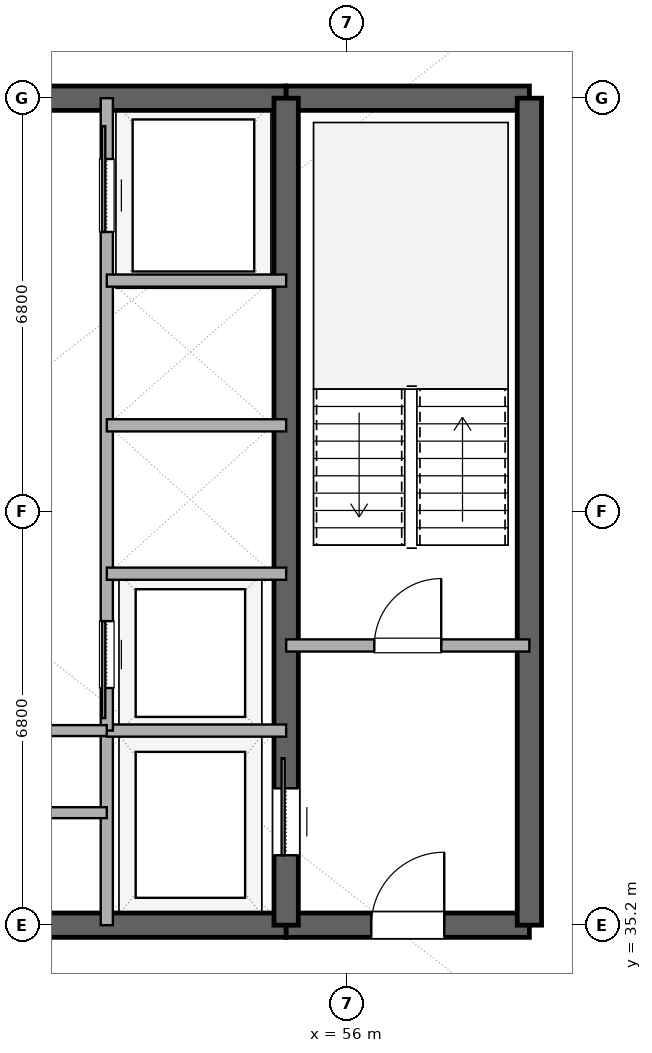
"""IFC4 building model, lengths in metres.
Left out: names, types, materials, properties, quantities, classifications, styles, units other than length and angle.
Written with IfcOpenShell. Run it as: python <this file> out.ifc"""

import sys

from ifc_helpers import new_model, si_unit, direction, frame, frame_2d, origin, place, context, subcontext, project, spatial, rectangle, extrude, element, fill, save


model = new_model("IFC4")
c1 = context("Model", 3, precision=1e-05, world=origin(), true_north=direction((0.0, 1.0)))
c2 = subcontext(c1, "Body", "Model", "MODEL_VIEW")
j1 = project(units=[si_unit("LENGTHUNIT", "METRE"), si_unit("PLANEANGLEUNIT", "RADIAN")], contexts=[c1])
p1 = place(None, origin())
s1 = spatial("IfcSite", under=j1, at=p1, CompositionType="ELEMENT")
p2 = place(p1, origin())
s2 = spatial("IfcBuilding", under=s1, at=p2, CompositionType="ELEMENT")
p3 = place(p2, frame((0.0, 0.0, 242.4)))
s3 = spatial("IfcBuildingStorey", under=s2, at=p3, CompositionType="ELEMENT", Elevation=242.4)
p4 = place(p3, frame((41.0, 35.2, 0.0), z_axis=(0.0, 0.0, 1.0), x_axis=(1.0, 0.0, 0.0)))
e1 = element("IfcWall", 1, at=p4, inside=s3, PredefinedType="SHEAR", context=c2, shape_type="SweptSolid", body=[
    extrude(rectangle(XDim=14.0, YDim=0.4, at=frame_2d((7.0, 0.0))), origin(), (0.0, 0.0, 1.0), 3.36),
])
p5 = place(p4, frame((6.1, 0.0, 0.0)))
e2 = element("IfcOpeningElement", 2, at=p5, cuts=e1, PredefinedType="OPENING", context=c2, shape_type="SweptSolid", body=[
    extrude(rectangle(XDim=1.8, YDim=2.25, at=frame_2d((0.9, 1.125))), frame((0.0, 0.21, 0.0), z_axis=(0.0, -1.0, 0.0), x_axis=(1.0, 0.0, 0.0)), (0.0, 0.0, 1.0), 0.42),
])
p6 = place(p3, frame((55.0, 35.2, 0.0), z_axis=(0.0, 0.0, 1.0), x_axis=(1.0, 0.0, 0.0)))
e3 = element("IfcWall", 3, at=p6, inside=s3, PredefinedType="SHEAR", context=c2, shape_type="SweptSolid", body=[
    extrude(rectangle(XDim=4.0, YDim=0.4, at=frame_2d((2.0, 0.0))), origin(), (0.0, 0.0, 1.0), 3.36),
])
p7 = place(p6, frame((1.4, 0.0, 0.0)))
e4 = element("IfcOpeningElement", 4, at=p7, cuts=e3, PredefinedType="OPENING", context=c2, shape_type="SweptSolid", body=[
    extrude(rectangle(XDim=1.2, YDim=2.15, at=frame_2d((0.6, 1.075))), frame((0.0, 0.21, 0.0), z_axis=(0.0, -1.0, 0.0), x_axis=(1.0, 0.0, 0.0)), (0.0, 0.0, 1.0), 0.42),
])
p8 = place(p3, frame((41.0, 48.8, 0.0), z_axis=(0.0, 0.0, 1.0), x_axis=(1.0, 0.0, 0.0)))
e5 = element("IfcWall", 5, at=p8, inside=s3, PredefinedType="SHEAR", context=c2, shape_type="SweptSolid", body=[
    extrude(rectangle(XDim=14.0, YDim=0.4, at=frame_2d((7.0, 0.0))), origin(), (0.0, 0.0, 1.0), 3.36),
])
p9 = place(p8, frame((6.1, 0.0, 0.0)))
e6 = element("IfcOpeningElement", 6, at=p9, cuts=e5, PredefinedType="OPENING", context=c2, shape_type="SweptSolid", body=[
    extrude(rectangle(XDim=1.8, YDim=2.25, at=frame_2d((0.9, 1.125))), frame((0.0, 0.21, 0.0), z_axis=(0.0, -1.0, 0.0), x_axis=(1.0, 0.0, 0.0)), (0.0, 0.0, 1.0), 0.42),
])
p10 = place(p3, frame((55.0, 48.8, 0.0), z_axis=(0.0, 0.0, 1.0), x_axis=(1.0, 0.0, 0.0)))
e7 = element("IfcWall", 7, at=p10, inside=s3, PredefinedType="SHEAR", context=c2, shape_type="SweptSolid", body=[
    extrude(rectangle(XDim=4.0, YDim=0.4, at=frame_2d((2.0, 0.0))), origin(), (0.0, 0.0, 1.0), 3.36),
])
p11 = place(p3, frame((59.0, 35.2, 0.0), z_axis=(0.0, 0.0, 1.0), x_axis=(0.0, 1.0, 0.0)))
e8 = element("IfcWall", 8, at=p11, inside=s3, PredefinedType="SHEAR", context=c2, shape_type="SweptSolid", body=[
    extrude(rectangle(XDim=13.6, YDim=0.4, at=frame_2d((6.8, 0.0))), origin(), (0.0, 0.0, 1.0), 3.36),
])
p12 = place(p3, frame((55.0, 35.2, 0.0), z_axis=(0.0, 0.0, 1.0), x_axis=(0.0, 1.0, 0.0)))
e9 = element("IfcWall", 9, at=p12, inside=s3, PredefinedType="SHEAR", context=c2, shape_type="SweptSolid", body=[
    extrude(rectangle(XDim=13.6, YDim=0.4, at=frame_2d((6.8, 0.0))), origin(), (0.0, 0.0, 1.0), 3.36),
])
p13 = place(p12, frame((1.15, 0.0, 0.0)))
e10 = element("IfcOpeningElement", 10, at=p13, cuts=e9, PredefinedType="OPENING", context=c2, shape_type="SweptSolid", body=[
    extrude(rectangle(XDim=1.1, YDim=2.2, at=frame_2d((0.55, 1.1))), frame((0.0, 0.21, 0.0), z_axis=(0.0, -1.0, 0.0), x_axis=(1.0, 0.0, 0.0)), (0.0, 0.0, 1.0), 0.42),
])
p14 = place(p3, frame((55.0, 39.8, 0.0), z_axis=(0.0, 0.0, 1.0), x_axis=(1.0, 0.0, 0.0)))
e11 = element("IfcWall", 11, at=p14, inside=s3, PredefinedType="SOLIDWALL", context=c2, shape_type="SweptSolid", body=[
    extrude(rectangle(XDim=4.0, YDim=0.2, at=frame_2d((2.0, 0.0))), origin(), (0.0, 0.0, 1.0), 2.72),
])
p15 = place(p14, frame((1.45, 0.0, 0.0)))
e12 = element("IfcOpeningElement", 12, at=p15, cuts=e11, PredefinedType="OPENING", context=c2, shape_type="SweptSolid", body=[
    extrude(rectangle(XDim=1.1, YDim=2.15, at=frame_2d((0.55, 1.075))), frame((0.0, 0.11, 0.0), z_axis=(0.0, -1.0, 0.0), x_axis=(1.0, 0.0, 0.0)), (0.0, 0.0, 1.0), 0.22),
])
p16 = place(p3, frame((52.05, 35.2, 0.0), z_axis=(0.0, 0.0, 1.0), x_axis=(0.0, 1.0, 0.0)))
e13 = element("IfcWall", 13, at=p16, inside=s3, PredefinedType="SOLIDWALL", context=c2, shape_type="SweptSolid", body=[
    extrude(rectangle(XDim=3.2, YDim=0.2, at=frame_2d((1.6, 0.0))), origin(), (0.0, 0.0, 1.0), 2.72),
])
p17 = place(p3, frame((52.05, 38.4, 0.0), z_axis=(0.0, 0.0, 1.0), x_axis=(1.0, 0.0, 0.0)))
e14 = element("IfcWall", 14, at=p17, inside=s3, PredefinedType="SOLIDWALL", context=c2, shape_type="SweptSolid", body=[
    extrude(rectangle(XDim=2.95, YDim=0.2, at=frame_2d((1.475, 0.0))), origin(), (0.0, 0.0, 1.0), 2.72),
])
p18 = place(p3, frame((52.05, 38.4, 0.0), z_axis=(0.0, 0.0, 1.0), x_axis=(0.0, 1.0, 0.0)))
e15 = element("IfcWall", 15, at=p18, inside=s3, PredefinedType="SOLIDWALL", context=c2, shape_type="SweptSolid", body=[
    extrude(rectangle(XDim=10.4, YDim=0.2, at=frame_2d((5.2, 0.0))), origin(), (0.0, 0.0, 1.0), 2.72),
])
p19 = place(p18, frame((0.7, 0.0, 0.0)))
e16 = element("IfcOpeningElement", 16, at=p19, cuts=e15, PredefinedType="OPENING", context=c2, shape_type="SweptSolid", body=[
    extrude(rectangle(XDim=1.1, YDim=2.2, at=frame_2d((0.55, 1.1))), frame((0.0, 0.11, 0.0), z_axis=(0.0, -1.0, 0.0), x_axis=(1.0, 0.0, 0.0)), (0.0, 0.0, 1.0), 0.22),
])
p20 = place(p18, frame((8.2, 0.0, 0.0)))
e17 = element("IfcOpeningElement", 17, at=p20, cuts=e15, PredefinedType="OPENING", context=c2, shape_type="SweptSolid", body=[
    extrude(rectangle(XDim=1.2, YDim=2.2, at=frame_2d((0.6, 1.1))), frame((0.0, 0.11, 0.0), z_axis=(0.0, -1.0, 0.0), x_axis=(1.0, 0.0, 0.0)), (0.0, 0.0, 1.0), 0.22),
])
for number, where, z_axis, x_axis in (
    (18, (52.05, 40.98, 0.0), (0.0, 0.0, 1.0), (1.0, 0.0, 0.0)),
    (19, (52.05, 43.42, 0.0), (0.0, 0.0, 1.0), (1.0, 0.0, 0.0)),
    (20, (52.05, 45.8, 0.0), (0.0, 0.0, 1.0), (1.0, 0.0, 0.0)),
):
    element("IfcWall", number, at=place(p3, frame(where, z_axis=z_axis, x_axis=x_axis)), inside=s3, PredefinedType="SOLIDWALL", context=c2, shape_type="SweptSolid", body=[
        extrude(rectangle(XDim=2.95, YDim=0.2, at=frame_2d((1.475, 0.0))), origin(), (0.0, 0.0, 1.0), 2.72),
    ])
for number, where, z_axis, x_axis in (
    (21, (49.2, 37.05, 0.0), (0.0, 0.0, 1.0), (1.0, 0.0, 0.0)),
    (22, (49.2, 38.4, 0.0), (0.0, 0.0, 1.0), (1.0, 0.0, 0.0)),
):
    element("IfcWall", number, at=place(p3, frame(where, z_axis=z_axis, x_axis=x_axis)), inside=s3, PredefinedType="PLUMBINGWALL", context=c2, shape_type="SweptSolid", body=[
        extrude(rectangle(XDim=2.85, YDim=0.18, at=frame_2d((1.425, 0.0))), origin(), (0.0, 0.0, 1.0), 2.72),
    ])
p21 = place(p13, origin())
e23 = element("IfcDoor", 23, at=p21, inside=s3, OperationType="SLIDING_TO_RIGHT", PredefinedType="DOOR", context=c2, shape_type="SweptSolid", body=[
    extrude(rectangle(XDim=1.1, YDim=2.2, at=frame_2d((0.55, 1.1))), frame((0.0, 0.025, 0.0), z_axis=(0.0, -1.0, 0.0), x_axis=(1.0, 0.0, 0.0)), (0.0, 0.0, 1.0), 0.05),
])
fill(e10, e23)
p22 = place(p7, origin())
e24 = element("IfcDoor", 24, at=p22, inside=s3, OperationType="SINGLE_SWING_RIGHT", PredefinedType="DOOR", context=c2, shape_type="SweptSolid", body=[
    extrude(rectangle(XDim=1.2, YDim=2.15, at=frame_2d((0.6, 1.075))), frame((0.0, 0.025, 0.0), z_axis=(0.0, -1.0, 0.0), x_axis=(1.0, 0.0, 0.0)), (0.0, 0.0, 1.0), 0.05),
])
fill(e4, e24)
p23 = place(p15, origin())
e25 = element("IfcDoor", 25, at=p23, inside=s3, OperationType="SINGLE_SWING_RIGHT", PredefinedType="DOOR", context=c2, shape_type="SweptSolid", body=[
    extrude(rectangle(XDim=1.1, YDim=2.15, at=frame_2d((0.55, 1.075))), frame((0.0, 0.025, 0.0), z_axis=(0.0, -1.0, 0.0), x_axis=(1.0, 0.0, 0.0)), (0.0, 0.0, 1.0), 0.05),
])
fill(e12, e25)
p24 = place(p19, origin())
e26 = element("IfcDoor", 26, at=p24, inside=s3, OperationType="SLIDING_TO_LEFT", PredefinedType="DOOR", context=c2, shape_type="SweptSolid", body=[
    extrude(rectangle(XDim=1.1, YDim=2.2, at=frame_2d((0.55, 1.1))), frame((0.0, 0.025, 0.0), z_axis=(0.0, -1.0, 0.0), x_axis=(1.0, 0.0, 0.0)), (0.0, 0.0, 1.0), 0.05),
])
fill(e16, e26)
p25 = place(p20, origin())
e27 = element("IfcDoor", 27, at=p25, inside=s3, OperationType="SLIDING_TO_RIGHT", PredefinedType="DOOR", context=c2, shape_type="SweptSolid", body=[
    extrude(rectangle(XDim=1.2, YDim=2.2, at=frame_2d((0.6, 1.1))), frame((0.0, 0.025, 0.0), z_axis=(0.0, -1.0, 0.0), x_axis=(1.0, 0.0, 0.0)), (0.0, 0.0, 1.0), 0.05),
])
fill(e17, e27)
save(model, sys.argv[1])
